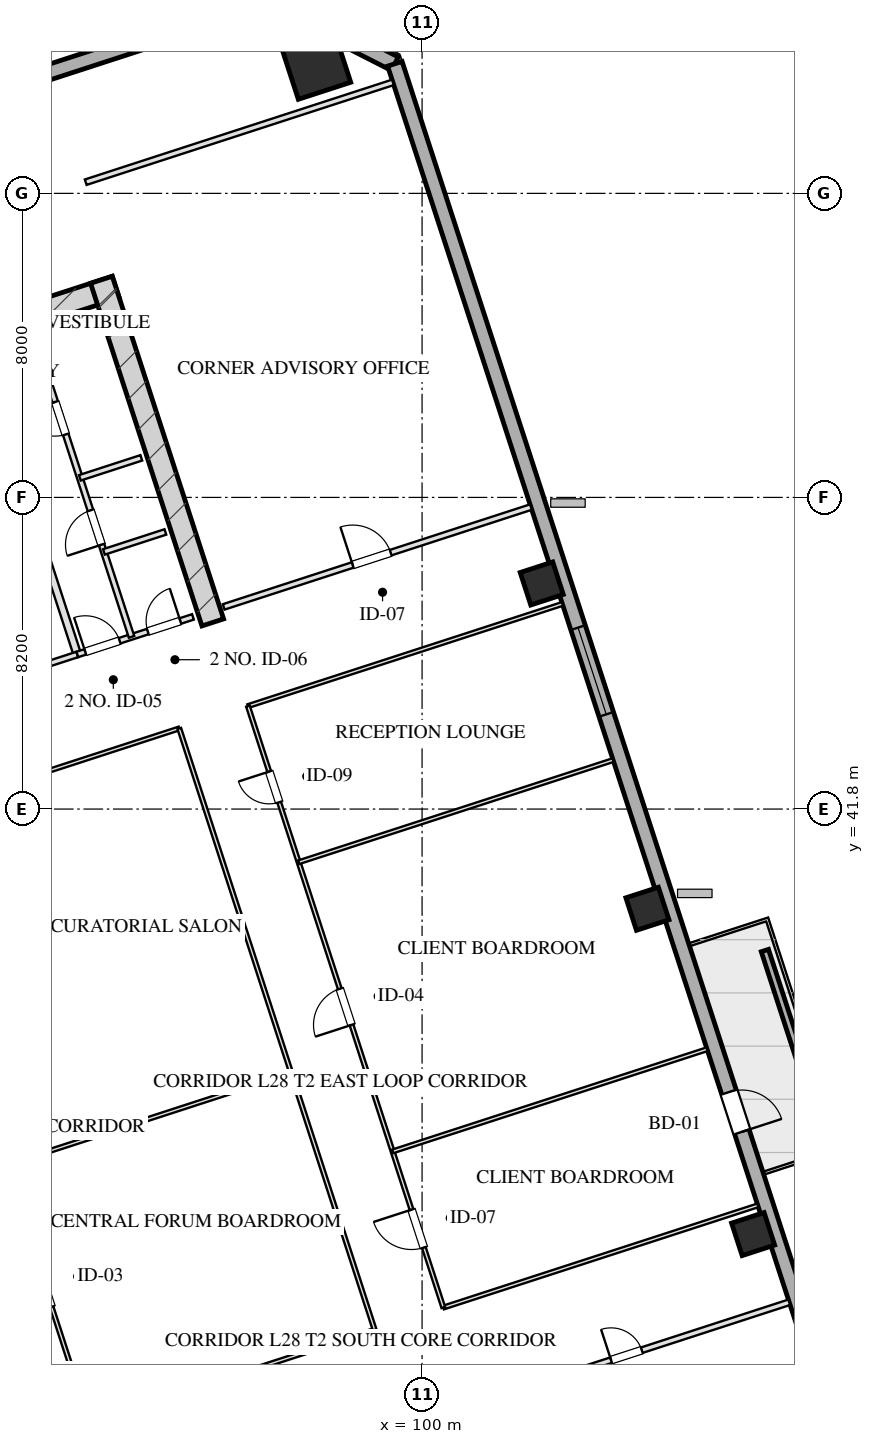
"""IFC4 building model, lengths in metres.
Left out: names, types, materials, properties, quantities, classifications, styles, units other than length and angle.
Written with IfcOpenShell. Run it as: python <this file> out.ifc"""

import sys

from ifc_helpers import new_model, si_unit, direction, frame, frame_2d, origin, origin_2d, place, context, subcontext, project, spatial, rectangle, hollow_rectangle, extrude, element, fill, save


model = new_model("IFC4")
c1 = context("Model", 3, precision=1e-05, world=origin(), true_north=direction((0.0, 1.0)))
c2 = subcontext(c1, "Body", "Model", "MODEL_VIEW")
j1 = project(units=[si_unit("LENGTHUNIT", "METRE"), si_unit("PLANEANGLEUNIT", "RADIAN")], contexts=[c1])
p1 = place(None, origin())
s1 = spatial("IfcSite", under=j1, at=p1, CompositionType="ELEMENT")
p2 = place(p1, origin())
s2 = spatial("IfcBuilding", under=s1, at=p2, CompositionType="ELEMENT")
p3 = place(p2, frame((0.0, 0.0, 110.4)))
s3 = spatial("IfcBuildingStorey", under=s2, at=p3, CompositionType="ELEMENT", Elevation=110.4)
p4 = place(p3, frame((76.344, 50.466, 0.0), z_axis=(0.0, 0.0, 1.0), x_axis=(0.951055727519, 0.309019421968, 0.0)))
e1 = element("IfcWall", 1, at=p4, inside=s3, PredefinedType="SHEAR", context=c2, shape_type="SweptSolid", body=[
    extrude(rectangle(XDim=16.4, YDim=0.6, at=frame_2d((8.2, 0.0))), origin(), (0.0, 0.0, 1.0), 3.45),
])
p5 = place(p3, frame((94.492, 46.71, 0.0), z_axis=(0.0, 0.0, 1.0), x_axis=(-0.309010370028, 0.95105866865, 0.0)))
e2 = element("IfcWall", 2, at=p5, inside=s3, PredefinedType="SHEAR", context=c2, shape_type="SweptSolid", body=[
    extrude(rectangle(XDim=9.48, YDim=0.6, at=frame_2d((4.74, 0.0))), origin(), (0.0, 0.0, 1.0), 3.45),
])
p6 = place(p3, frame((97.209, 61.388, 0.0), z_axis=(0.0, 0.0, 1.0), x_axis=(0.951056516295, 0.309016994375, 0.0)))
e3 = element("IfcColumn", 3, at=p6, inside=s3, PredefinedType="COLUMN", context=c2, shape_type="SweptSolid", body=[
    extrude(hollow_rectangle(XDim=1.45, YDim=1.45, WallThickness=0.05, at=origin_2d()), origin(), (0.0, 0.0, 1.0), 3.451),
])
for number, where, z_axis, x_axis in (
    (4, (108.711, 30.616, 0.0), (0.0, 0.0, 1.0), (0.951, 0.309, 0.0)),
    (5, (105.93, 39.176, 0.0), (0.0, 0.0, 1.0), (0.951, 0.309, 0.0)),
    (6, (103.149, 47.736, 0.0), (0.0, 0.0, 1.0), (0.951, 0.309, 0.0)),
):
    element("IfcColumn", number, at=place(p3, frame(where, z_axis=z_axis, x_axis=x_axis)), inside=s3, PredefinedType="COLUMN", context=c2, shape_type="SweptSolid", body=[
        extrude(hollow_rectangle(XDim=0.9, YDim=0.9, WallThickness=0.032, at=origin_2d()), origin(), (0.0, 0.0, 1.0), 3.451),
    ])
p7 = place(p3, frame((68.047, 53.995, 0.0), z_axis=(0.0, 0.0, 1.0), x_axis=(0.95105505922, 0.309021478754, 0.0)))
e7 = element("IfcWall", 7, at=p7, inside=s3, PredefinedType="SOLIDWALL", context=c2, shape_type="SweptSolid", body=[
    extrude(rectangle(XDim=29.4, YDim=0.4, at=frame_2d((14.7, 0.0))), origin(), (0.0, 0.0, 1.0), 2.61),
])
p8 = place(p3, frame((96.008, 63.08, 0.0), z_axis=(0.0, 0.0, 1.0), x_axis=(0.891001999643, -0.45399937955, 0.0)))
e8 = element("IfcWall", 8, at=p8, inside=s3, PredefinedType="SOLIDWALL", context=c2, shape_type="SweptSolid", body=[
    extrude(rectangle(XDim=3.677, YDim=0.4, at=frame_2d((1.839, 0.0))), origin(), (0.0, 0.0, 1.0), 2.61),
])
p9 = place(p3, frame((99.284, 61.41, 0.0), z_axis=(0.0, 0.0, 1.0), x_axis=(0.309017542002, -0.95105633836, 0.0)))
e9 = element("IfcWall", 9, at=p9, inside=s3, PredefinedType="SOLIDWALL", context=c2, shape_type="SweptSolid", body=[
    extrude(rectangle(XDim=46.4, YDim=0.4, at=frame_2d((23.2, 0.0))), origin(), (0.0, 0.0, 1.0), 2.61),
])
p10 = place(p9, frame((15.6, 0.0, 0.75)))
e10 = element("IfcOpeningElement", 10, at=p10, cuts=e9, PredefinedType="OPENING", context=c2, shape_type="SweptSolid", body=[
    extrude(rectangle(XDim=2.4, YDim=1.46, at=frame_2d((1.2, 0.73))), frame((0.0, 0.21, 0.0), z_axis=(0.0, -1.0, 0.0), x_axis=(1.0, 0.0, 0.0)), (0.0, 0.0, 1.0), 0.42),
])
p11 = place(p9, frame((28.45, 0.0, 0.0)))
e11 = element("IfcOpeningElement", 11, at=p11, cuts=e9, PredefinedType="OPENING", context=c2, shape_type="SweptSolid", body=[
    extrude(rectangle(XDim=1.1, YDim=2.15, at=frame_2d((0.55, 1.075))), frame((0.0, 0.21, 0.0), z_axis=(0.0, -1.0, 0.0), x_axis=(1.0, 0.0, 0.0)), (0.0, 0.0, 1.0), 0.42),
])
p12 = place(p3, frame((110.504, 33.512, 0.0), z_axis=(0.0, 0.0, 1.0), x_axis=(-0.308986014439, 0.951066581729, 0.0)))
e12 = element("IfcWall", 12, at=p12, inside=s3, PredefinedType="PARAPET", context=c2, shape_type="SweptSolid", body=[
    extrude(rectangle(XDim=4.8, YDim=0.2, at=frame_2d((2.4, 0.0))), origin(), (0.0, 0.0, 1.0), 0.75),
])
p13 = place(p3, frame((90.928, 45.868, 0.0), z_axis=(0.0, 0.0, 1.0), x_axis=(-0.309042196757, 0.951048327176, 0.0)))
e13 = element("IfcWall", 13, at=p13, inside=s3, PredefinedType="PARTITIONING", context=c2, shape_type="SweptSolid", body=[
    extrude(rectangle(XDim=8.43, YDim=0.2, at=frame_2d((4.215, 0.0))), origin(), (0.0, 0.0, 1.0), 3.175),
])
p14 = place(p3, frame((86.743, 44.508, 0.0), z_axis=(0.0, 0.0, 1.0), x_axis=(0.951063829732, 0.308994485023, 0.0)))
e14 = element("IfcWall", 14, at=p14, inside=s3, PredefinedType="PARTITIONING", context=c2, shape_type="SweptSolid", body=[
    extrude(rectangle(XDim=4.4, YDim=0.15, at=frame_2d((2.2, 0.0))), origin(), (0.0, 0.0, 1.0), 3.175),
])
p15 = place(p14, frame((1.45, 0.0, 0.0)))
e15 = element("IfcOpeningElement", 15, at=p15, cuts=e14, PredefinedType="OPENING", context=c2, shape_type="SweptSolid", body=[
    extrude(rectangle(XDim=1.5, YDim=2.05, at=frame_2d((0.75, 1.025))), frame((0.0, 0.085, 0.0), z_axis=(0.0, -1.0, 0.0), x_axis=(1.0, 0.0, 0.0)), (0.0, 0.0, 1.0), 0.17),
])
p16 = place(p3, frame((90.928, 45.868, 0.0), z_axis=(0.0, 0.0, 1.0), x_axis=(0.951059297078, 0.309008435874, 0.0)))
e16 = element("IfcWall", 16, at=p16, inside=s3, PredefinedType="PARTITIONING", context=c2, shape_type="SweptSolid", body=[
    extrude(rectangle(XDim=3.2, YDim=0.15, at=frame_2d((1.6, 0.0))), origin(), (0.0, 0.0, 1.0), 3.175),
])
p17 = place(p16, frame((0.22, 0.0, 0.0)))
e17 = element("IfcOpeningElement", 17, at=p17, cuts=e16, PredefinedType="OPENING", context=c2, shape_type="SweptSolid", body=[
    extrude(rectangle(XDim=0.95, YDim=2.05, at=frame_2d((0.475, 1.025))), frame((0.0, 0.085, 0.0), z_axis=(0.0, -1.0, 0.0), x_axis=(1.0, 0.0, 0.0)), (0.0, 0.0, 1.0), 0.17),
])
p18 = place(p16, frame((1.95, 0.0, 0.0)))
e18 = element("IfcOpeningElement", 18, at=p18, cuts=e16, PredefinedType="OPENING", context=c2, shape_type="SweptSolid", body=[
    extrude(rectangle(XDim=0.9, YDim=2.05, at=frame_2d((0.45, 1.025))), frame((0.0, 0.085, 0.0), z_axis=(0.0, -1.0, 0.0), x_axis=(1.0, 0.0, 0.0)), (0.0, 0.0, 1.0), 0.17),
])
p19 = place(p3, frame((92.355, 46.331, 0.0), z_axis=(0.0, 0.0, 1.0), x_axis=(-0.309007490203, 0.951059604335, 0.0)))
e19 = element("IfcWall", 19, at=p19, inside=s3, PredefinedType="PARTITIONING", context=c2, shape_type="SweptSolid", body=[
    extrude(rectangle(XDim=8.43, YDim=0.15, at=frame_2d((4.215, 0.0))), origin(), (0.0, 0.0, 1.0), 3.175),
])
p20 = place(p19, frame((2.55, 0.0, 0.0)))
e20 = element("IfcOpeningElement", 20, at=p20, cuts=e19, PredefinedType="OPENING", context=c2, shape_type="SweptSolid", body=[
    extrude(rectangle(XDim=0.95, YDim=2.05, at=frame_2d((0.475, 1.025))), frame((0.0, 0.085, 0.0), z_axis=(0.0, -1.0, 0.0), x_axis=(1.0, 0.0, 0.0)), (0.0, 0.0, 1.0), 0.17),
])
p21 = place(p19, frame((5.6, 0.0, 0.0)))
e21 = element("IfcOpeningElement", 21, at=p21, cuts=e19, PredefinedType="OPENING", context=c2, shape_type="SweptSolid", body=[
    extrude(rectangle(XDim=0.9, YDim=2.05, at=frame_2d((0.45, 1.025))), frame((0.0, 0.085, 0.0), z_axis=(0.0, -1.0, 0.0), x_axis=(1.0, 0.0, 0.0)), (0.0, 0.0, 1.0), 0.17),
])
p22 = place(p3, frame((90.995, 50.516, 0.0), z_axis=(0.0, 0.0, 1.0), x_axis=(0.951040401051, 0.309066587596, 0.0)))
e22 = element("IfcWall", 22, at=p22, inside=s3, PredefinedType="PARTITIONING", context=c2, shape_type="SweptSolid", body=[
    extrude(rectangle(XDim=1.7, YDim=0.15, at=frame_2d((0.85, 0.0))), origin(), (0.0, 0.0, 1.0), 3.175),
])
p23 = place(p3, frame((91.628, 48.566, 0.0), z_axis=(0.0, 0.0, 1.0), x_axis=(0.951054116971, 0.309024378638, 0.0)))
e23 = element("IfcWall", 23, at=p23, inside=s3, PredefinedType="PARTITIONING", context=c2, shape_type="SweptSolid", body=[
    extrude(rectangle(XDim=1.7, YDim=0.15, at=frame_2d((0.85, 0.0))), origin(), (0.0, 0.0, 1.0), 3.175),
])
p24 = place(p3, frame((101.578, 26.196, 0.0), z_axis=(0.0, 0.0, 1.0), x_axis=(0.951062770994, 0.308997743729, 0.0)))
e24 = element("IfcWall", 24, at=p24, inside=s3, PredefinedType="PARTITIONING", context=c2, shape_type="SweptSolid", body=[
    extrude(rectangle(XDim=8.5, YDim=0.15, at=frame_2d((4.25, 0.0))), origin(), (0.0, 0.0, 1.0), 3.175),
])
p25 = place(p24, frame((3.57, 0.0, 0.0)))
e25 = element("IfcOpeningElement", 25, at=p25, cuts=e24, PredefinedType="OPENING", context=c2, shape_type="SweptSolid", body=[
    extrude(rectangle(XDim=0.85, YDim=2.05, at=frame_2d((0.425, 1.025))), frame((0.0, 0.085, 0.0), z_axis=(0.0, -1.0, 0.0), x_axis=(1.0, 0.0, 0.0)), (0.0, 0.0, 1.0), 0.17),
])
p26 = place(p3, frame((91.149, 58.294, 0.0), z_axis=(0.0, 0.0, 1.0), x_axis=(0.951062770994, 0.308997743729, 0.0)))
e26 = element("IfcWall", 26, at=p26, inside=s3, PredefinedType="PARTITIONING", context=c2, shape_type="SweptSolid", body=[
    extrude(rectangle(XDim=8.5, YDim=0.15, at=frame_2d((4.25, 0.0))), origin(), (0.0, 0.0, 1.0), 3.175),
])
p27 = place(p3, frame((94.78, 47.119, 0.0), z_axis=(0.0, 0.0, 1.0), x_axis=(0.951054329824, 0.309023723562, 0.0)))
e27 = element("IfcWall", 27, at=p27, inside=s3, PredefinedType="PARTITIONING", context=c2, shape_type="SweptSolid", body=[
    extrude(rectangle(XDim=8.5, YDim=0.15, at=frame_2d((4.25, 0.0))), origin(), (0.0, 0.0, 1.0), 3.175),
])
p28 = place(p27, frame((3.57, 0.0, 0.0)))
e28 = element("IfcOpeningElement", 28, at=p28, cuts=e27, PredefinedType="OPENING", context=c2, shape_type="SweptSolid", body=[
    extrude(rectangle(XDim=1.05, YDim=2.05, at=frame_2d((0.525, 1.025))), frame((0.0, 0.085, 0.0), z_axis=(0.0, -1.0, 0.0), x_axis=(1.0, 0.0, 0.0)), (0.0, 0.0, 1.0), 0.17),
])
p29 = place(p3, frame((91.24, 25.655, 0.0), z_axis=(0.0, 0.0, 1.0), x_axis=(0.951060182336, 0.309005711233, 0.0)))
e29 = element("IfcWall", 29, at=p29, inside=s3, PredefinedType="MOVABLE", context=c2, shape_type="SweptSolid", body=[
    extrude(rectangle(XDim=7.9, YDim=0.1, at=frame_2d((3.95, 0.0))), origin(), (0.0, 0.0, 1.0), 3.175),
])
p30 = place(p3, frame((100.56, 28.683, 0.0), z_axis=(0.0, 0.0, 1.0), x_axis=(0.951055307445, 0.309020714809, 0.0)))
e30 = element("IfcWall", 30, at=p30, inside=s3, PredefinedType="MOVABLE", context=c2, shape_type="SweptSolid", body=[
    extrude(rectangle(XDim=8.7, YDim=0.1, at=frame_2d((4.35, 0.0))), origin(), (0.0, 0.0, 1.0), 3.175),
])
p31 = place(p3, frame((86.097, 41.48, 0.0), z_axis=(0.0, 0.0, 1.0), x_axis=(0.951060182336, 0.309005711233, 0.0)))
e31 = element("IfcWall", 31, at=p31, inside=s3, PredefinedType="MOVABLE", context=c2, shape_type="SweptSolid", body=[
    extrude(rectangle(XDim=7.9, YDim=0.1, at=frame_2d((3.95, 0.0))), origin(), (0.0, 0.0, 1.0), 3.175),
])
p32 = place(p3, frame((95.418, 44.509, 0.0), z_axis=(0.0, 0.0, 1.0), x_axis=(0.951055307445, 0.309020714809, 0.0)))
e32 = element("IfcWall", 32, at=p32, inside=s3, PredefinedType="MOVABLE", context=c2, shape_type="SweptSolid", body=[
    extrude(rectangle(XDim=8.7, YDim=0.1, at=frame_2d((4.35, 0.0))), origin(), (0.0, 0.0, 1.0), 3.175),
])
p33 = place(p3, frame((91.24, 25.655, 0.0), z_axis=(0.0, 0.0, 1.0), x_axis=(-0.30901773025, 0.951056277195, 0.0)))
e33 = element("IfcWall", 33, at=p33, inside=s3, PredefinedType="MOVABLE", context=c2, shape_type="SweptSolid", body=[
    extrude(rectangle(XDim=16.64, YDim=0.1, at=frame_2d((8.32, 0.0))), origin(), (0.0, 0.0, 1.0), 3.175),
])
p34 = place(p33, frame((3.204, 0.0, 0.0)))
e34 = element("IfcOpeningElement", 34, at=p34, cuts=e33, PredefinedType="OPENING", context=c2, shape_type="SweptSolid", body=[
    extrude(rectangle(XDim=1.1, YDim=2.05, at=frame_2d((0.55, 1.025))), frame((0.0, 0.06, 0.0), z_axis=(0.0, -1.0, 0.0), x_axis=(1.0, 0.0, 0.0)), (0.0, 0.0, 1.0), 0.12),
])
p35 = place(p33, frame((11.404, 0.0, 0.0)))
e35 = element("IfcOpeningElement", 35, at=p35, cuts=e33, PredefinedType="OPENING", context=c2, shape_type="SweptSolid", body=[
    extrude(rectangle(XDim=1.1, YDim=2.05, at=frame_2d((0.55, 1.025))), frame((0.0, 0.06, 0.0), z_axis=(0.0, -1.0, 0.0), x_axis=(1.0, 0.0, 0.0)), (0.0, 0.0, 1.0), 0.12),
])
p36 = place(p3, frame((98.753, 28.096, 0.0), z_axis=(0.0, 0.0, 1.0), x_axis=(-0.30901773025, 0.951056277195, 0.0)))
e36 = element("IfcWall", 36, at=p36, inside=s3, PredefinedType="MOVABLE", context=c2, shape_type="SweptSolid", body=[
    extrude(rectangle(XDim=16.64, YDim=0.1, at=frame_2d((8.32, 0.0))), origin(), (0.0, 0.0, 1.0), 3.175),
])
p37 = place(p3, frame((100.56, 28.683, 0.0), z_axis=(0.0, 0.0, 1.0), x_axis=(-0.309004459387, 0.951060589068, 0.0)))
e37 = element("IfcWall", 37, at=p37, inside=s3, PredefinedType="MOVABLE", context=c2, shape_type="SweptSolid", body=[
    extrude(rectangle(XDim=16.64, YDim=0.1, at=frame_2d((8.32, 0.0))), origin(), (0.0, 0.0, 1.0), 3.175),
])
p38 = place(p37, frame((1.66, 0.0, 0.0)))
e38 = element("IfcOpeningElement", 38, at=p38, cuts=e37, PredefinedType="OPENING", context=c2, shape_type="SweptSolid", body=[
    extrude(rectangle(XDim=1.05, YDim=2.05, at=frame_2d((0.525, 1.025))), frame((0.0, 0.06, 0.0), z_axis=(0.0, -1.0, 0.0), x_axis=(1.0, 0.0, 0.0)), (0.0, 0.0, 1.0), 0.12),
])
p39 = place(p37, frame((7.82, 0.0, 0.0)))
e39 = element("IfcOpeningElement", 39, at=p39, cuts=e37, PredefinedType="OPENING", context=c2, shape_type="SweptSolid", body=[
    extrude(rectangle(XDim=1.0, YDim=2.05, at=frame_2d((0.5, 1.025))), frame((0.0, 0.06, 0.0), z_axis=(0.0, -1.0, 0.0), x_axis=(1.0, 0.0, 0.0)), (0.0, 0.0, 1.0), 0.12),
])
p40 = place(p37, frame((13.98, 0.0, 0.0)))
e40 = element("IfcOpeningElement", 40, at=p40, cuts=e37, PredefinedType="OPENING", context=c2, shape_type="SweptSolid", body=[
    extrude(rectangle(XDim=0.85, YDim=2.05, at=frame_2d((0.425, 1.025))), frame((0.0, 0.06, 0.0), z_axis=(0.0, -1.0, 0.0), x_axis=(1.0, 0.0, 0.0)), (0.0, 0.0, 1.0), 0.12),
])
p41 = place(p3, frame((89.039, 32.426, 0.0), z_axis=(0.0, 0.0, 1.0), x_axis=(0.951051099951, 0.309033663672, 0.0)))
e41 = element("IfcWall", 41, at=p41, inside=s3, PredefinedType="MOVABLE", context=c2, shape_type="SweptSolid", body=[
    extrude(rectangle(XDim=7.9, YDim=0.1, at=frame_2d((3.95, 0.0))), origin(), (0.0, 0.0, 1.0), 3.175),
])
p42 = place(p3, frame((99.225, 32.792, 0.0), z_axis=(0.0, 0.0, 1.0), x_axis=(0.951055307445, 0.309020714809, 0.0)))
e42 = element("IfcWall", 42, at=p42, inside=s3, PredefinedType="MOVABLE", context=c2, shape_type="SweptSolid", body=[
    extrude(rectangle(XDim=8.7, YDim=0.1, at=frame_2d((4.35, 0.0))), origin(), (0.0, 0.0, 1.0), 3.175),
])
p43 = place(p3, frame((96.753, 40.4, 0.0), z_axis=(0.0, 0.0, 1.0), x_axis=(0.951057987102, 0.309012467661, 0.0)))
e43 = element("IfcWall", 43, at=p43, inside=s3, PredefinedType="MOVABLE", context=c2, shape_type="SweptSolid", body=[
    extrude(rectangle(XDim=8.7, YDim=0.1, at=frame_2d((4.35, 0.0))), origin(), (0.0, 0.0, 1.0), 3.175),
])
p44 = place(p10, origin())
e44 = element("IfcWindow", 44, at=p44, inside=s3, PartitioningType="TRIPLE_PANEL_VERTICAL", PredefinedType="WINDOW", context=c2, shape_type="SweptSolid", body=[
    extrude(rectangle(XDim=2.4, YDim=1.46, at=frame_2d((1.2, 0.73))), frame((0.0, 0.03, 0.0), z_axis=(0.0, -1.0, 0.0), x_axis=(1.0, 0.0, 0.0)), (0.0, 0.0, 1.0), 0.06),
])
fill(e10, e44)
p45 = place(p11, origin())
e45 = element("IfcDoor", 45, at=p45, inside=s3, OperationType="SINGLE_SWING_RIGHT", PredefinedType="DOOR", context=c2, shape_type="SweptSolid", body=[
    extrude(rectangle(XDim=1.1, YDim=2.15, at=frame_2d((0.55, 1.075))), frame((0.0, 0.025, 0.0), z_axis=(0.0, -1.0, 0.0), x_axis=(1.0, 0.0, 0.0)), (0.0, 0.0, 1.0), 0.05),
])
fill(e11, e45)
p46 = place(p17, origin())
e46 = element("IfcDoor", 46, at=p46, inside=s3, OperationType="SINGLE_SWING_LEFT", PredefinedType="DOOR", context=c2, shape_type="SweptSolid", body=[
    extrude(rectangle(XDim=0.95, YDim=2.05, at=frame_2d((0.475, 1.025))), frame((0.0, 0.025, 0.0), z_axis=(0.0, -1.0, 0.0), x_axis=(1.0, 0.0, 0.0)), (0.0, 0.0, 1.0), 0.05),
])
fill(e17, e46)
p47 = place(p18, origin())
e47 = element("IfcDoor", 47, at=p47, inside=s3, OperationType="SINGLE_SWING_RIGHT", PredefinedType="DOOR", context=c2, shape_type="SweptSolid", body=[
    extrude(rectangle(XDim=0.9, YDim=2.05, at=frame_2d((0.45, 1.025))), frame((0.0, 0.025, 0.0), z_axis=(0.0, -1.0, 0.0), x_axis=(1.0, 0.0, 0.0)), (0.0, 0.0, 1.0), 0.05),
])
fill(e18, e47)
p48 = place(p20, origin())
e48 = element("IfcDoor", 48, at=p48, inside=s3, OperationType="SINGLE_SWING_LEFT", PredefinedType="DOOR", context=c2, shape_type="SweptSolid", body=[
    extrude(rectangle(XDim=0.95, YDim=2.05, at=frame_2d((0.475, 1.025))), frame((0.0, 0.025, 0.0), z_axis=(0.0, -1.0, 0.0), x_axis=(1.0, 0.0, 0.0)), (0.0, 0.0, 1.0), 0.05),
])
fill(e20, e48)
p49 = place(p21, origin())
e49 = element("IfcDoor", 49, at=p49, inside=s3, OperationType="SINGLE_SWING_RIGHT", PredefinedType="DOOR", context=c2, shape_type="SweptSolid", body=[
    extrude(rectangle(XDim=0.9, YDim=2.05, at=frame_2d((0.45, 1.025))), frame((0.0, 0.025, 0.0), z_axis=(0.0, -1.0, 0.0), x_axis=(1.0, 0.0, 0.0)), (0.0, 0.0, 1.0), 0.05),
])
fill(e21, e49)
p50 = place(p25, origin())
e50 = element("IfcDoor", 50, at=p50, inside=s3, OperationType="SINGLE_SWING_LEFT", PredefinedType="DOOR", context=c2, shape_type="SweptSolid", body=[
    extrude(rectangle(XDim=0.85, YDim=2.05, at=frame_2d((0.425, 1.025))), frame((0.0, 0.025, 0.0), z_axis=(0.0, -1.0, 0.0), x_axis=(1.0, 0.0, 0.0)), (0.0, 0.0, 1.0), 0.05),
])
fill(e25, e50)
p51 = place(p28, origin())
e51 = element("IfcDoor", 51, at=p51, inside=s3, OperationType="SINGLE_SWING_LEFT", PredefinedType="DOOR", context=c2, shape_type="SweptSolid", body=[
    extrude(rectangle(XDim=1.05, YDim=2.05, at=frame_2d((0.525, 1.025))), frame((0.0, 0.025, 0.0), z_axis=(0.0, -1.0, 0.0), x_axis=(1.0, 0.0, 0.0)), (0.0, 0.0, 1.0), 0.05),
])
fill(e28, e51)
p52 = place(p34, origin())
e52 = element("IfcDoor", 52, at=p52, inside=s3, OperationType="SINGLE_SWING_LEFT", PredefinedType="DOOR", context=c2, shape_type="SweptSolid", body=[
    extrude(rectangle(XDim=1.1, YDim=2.05, at=frame_2d((0.55, 1.025))), frame((0.0, 0.025, 0.0), z_axis=(0.0, -1.0, 0.0), x_axis=(1.0, 0.0, 0.0)), (0.0, 0.0, 1.0), 0.05),
])
fill(e34, e52)
p53 = place(p38, origin())
e53 = element("IfcDoor", 53, at=p53, inside=s3, OperationType="SINGLE_SWING_RIGHT", PredefinedType="DOOR", context=c2, shape_type="SweptSolid", body=[
    extrude(rectangle(XDim=1.05, YDim=2.05, at=frame_2d((0.525, 1.025))), frame((0.0, 0.025, 0.0), z_axis=(0.0, -1.0, 0.0), x_axis=(1.0, 0.0, 0.0)), (0.0, 0.0, 1.0), 0.05),
])
fill(e38, e53)
p54 = place(p39, origin())
e54 = element("IfcDoor", 54, at=p54, inside=s3, OperationType="SINGLE_SWING_LEFT", PredefinedType="DOOR", context=c2, shape_type="SweptSolid", body=[
    extrude(rectangle(XDim=1.0, YDim=2.05, at=frame_2d((0.5, 1.025))), frame((0.0, 0.025, 0.0), z_axis=(0.0, -1.0, 0.0), x_axis=(1.0, 0.0, 0.0)), (0.0, 0.0, 1.0), 0.05),
])
fill(e39, e54)
p55 = place(p40, origin())
e55 = element("IfcDoor", 55, at=p55, inside=s3, OperationType="SINGLE_SWING_RIGHT", PredefinedType="DOOR", context=c2, shape_type="SweptSolid", body=[
    extrude(rectangle(XDim=0.85, YDim=2.05, at=frame_2d((0.425, 1.025))), frame((0.0, 0.025, 0.0), z_axis=(0.0, -1.0, 0.0), x_axis=(1.0, 0.0, 0.0)), (0.0, 0.0, 1.0), 0.05),
])
fill(e40, e55)
save(model, sys.argv[1])
